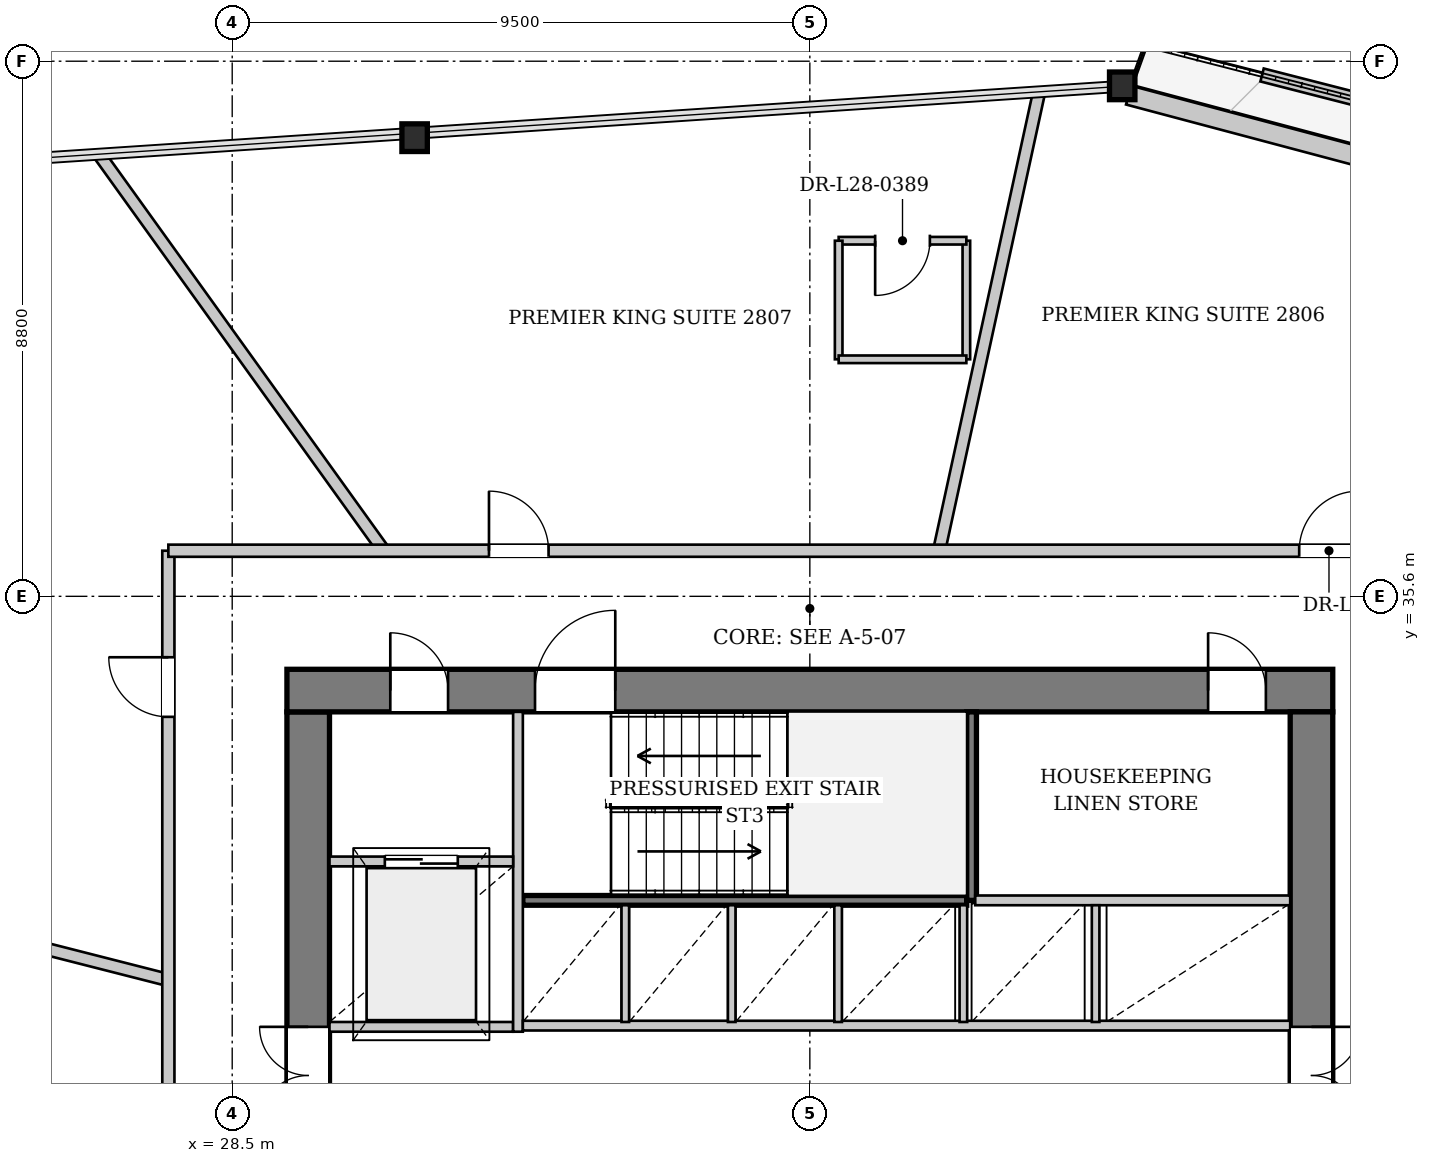
"""IFC4 building model, lengths in metres.
Left out: names, types, materials, properties, quantities, classifications, styles, units other than length and angle.
Written with IfcOpenShell. Run it as: python <this file> out.ifc"""

import sys

from ifc_helpers import new_model, si_unit, direction, frame, frame_2d, origin, origin_2d, place, context, subcontext, project, spatial, rectangle, i_section, extrude, source, transform, mapped, element, fill, save


model = new_model("IFC4")
c1 = context("Model", 3, precision=1e-05, world=origin(), true_north=direction((0.0, 1.0)))
c2 = subcontext(c1, "Body", "Model", "MODEL_VIEW")
j1 = project(units=[si_unit("LENGTHUNIT", "METRE"), si_unit("PLANEANGLEUNIT", "RADIAN")], contexts=[c1])
p1 = place(None, origin())
s1 = spatial("IfcSite", under=j1, at=p1, CompositionType="ELEMENT")
p2 = place(p1, origin())
s2 = spatial("IfcBuilding", under=s1, at=p2, CompositionType="ELEMENT")
p3 = place(p2, frame((0.0, 0.0, 109.25)))
s3 = spatial("IfcBuildingStorey", under=s2, at=p3, CompositionType="ELEMENT", Elevation=109.25)
m1 = source(origin(), c2, "Body", "SweptSolid", [
    extrude(i_section(OverallWidth=0.418, OverallDepth=0.455, WebThickness=0.038, FlangeThickness=0.059, at=origin_2d()), origin(), (0.0, 0.0, 1.0), 3.397),
])
p4 = place(p3, frame((43.282, 43.997, 0.0), z_axis=(-0.085299167136, -0.001221639293, 0.996354635501), x_axis=(0.014320351133, -0.999897458514, 0.0)))
e1 = element("IfcColumn", 1, at=p4, inside=s3, PredefinedType="COLUMN", context=c2, shape_type="MappedRepresentation", body=[
    mapped(m1, transform((0.0, 0.0, 0.0), x_axis=(1.0, 0.0, 0.0), y_axis=(0.0, 1.0, 0.0), z_axis=(0.0, 0.0, 1.0), scale=1.0)),
])
m2 = source(origin(), c2, "Body", "SweptSolid", [
    extrude(i_section(OverallWidth=0.418, OverallDepth=0.455, WebThickness=0.038, FlangeThickness=0.059, at=origin_2d()), origin(), (0.0, 0.0, 1.0), 3.399),
])
p5 = place(p3, frame((31.631, 43.224, 0.0), z_axis=(-0.077283730653, -0.04797911903, 0.995854019982), x_axis=(0.527441478949, -0.849591364295, 0.0)))
e2 = element("IfcColumn", 2, at=p5, inside=s3, PredefinedType="COLUMN", context=c2, shape_type="MappedRepresentation", body=[
    mapped(m2, transform((0.0, 0.0, 0.0), x_axis=(1.0, 0.0, 0.0), y_axis=(0.0, 1.0, 0.0), z_axis=(0.0, 0.0, 1.0), scale=1.0)),
])
p6 = place(p3, frame((43.241, 43.843, 0.0), z_axis=(0.0, 0.0, 1.0), x_axis=(0.966426577456, -0.256942932161, 0.0)))
e3 = element("IfcWall", 3, at=p6, inside=s3, PredefinedType="SOLIDWALL", context=c2, shape_type="SweptSolid", body=[
    extrude(rectangle(XDim=23.353, YDim=0.32, at=frame_2d((11.677, 0.0))), origin(), (0.0, 0.0, 1.0), 2.692),
])
p7 = place(p6, frame((6.923, 0.0, 0.0)))
e4 = element("IfcOpeningElement", 4, at=p7, cuts=e3, PredefinedType="OPENING", context=c2, shape_type="SweptSolid", body=[
    extrude(rectangle(XDim=1.1, YDim=2.3, at=frame_2d((0.55, 1.15))), frame((0.0, 0.17, 0.0), z_axis=(0.0, -1.0, 0.0), x_axis=(1.0, 0.0, 0.0)), (0.0, 0.0, 1.0), 0.34),
])
p8 = place(p6, frame((15.281, 0.0, 0.372)))
e5 = element("IfcOpeningElement", 5, at=p8, cuts=e3, PredefinedType="OPENING", context=c2, shape_type="SweptSolid", body=[
    extrude(rectangle(XDim=1.8, YDim=2.2, at=frame_2d((0.9, 1.1))), frame((0.0, 0.17, 0.0), z_axis=(0.0, -1.0, 0.0), x_axis=(1.0, 0.0, 0.0)), (0.0, 0.0, 1.0), 0.34),
])
p9 = place(p3, frame((65.542, 39.022, 0.0), z_axis=(0.0, 0.0, 1.0), x_axis=(-0.968702389273, 0.248225061217, 0.0)))
e6 = element("IfcWall", 6, at=p9, inside=s3, PredefinedType="PARAPET", context=c2, shape_type="SweptSolid", body=[
    extrude(rectangle(XDim=20.754, YDim=0.22, at=frame_2d((10.377, 0.0))), origin(), (0.0, 0.0, 1.0), 0.3),
])
p10 = place(p3, frame((29.75, 19.5, 0.0), z_axis=(0.0, 0.0, 1.0), x_axis=(0.0, 1.0, 0.0)))
e7 = element("IfcWall", 7, at=p10, inside=s3, PredefinedType="SHEAR", context=c2, shape_type="SweptSolid", body=[
    extrude(rectangle(XDim=14.2, YDim=0.7, at=frame_2d((7.1, 0.0))), origin(), (0.0, 0.0, 1.0), 3.3),
])
p11 = place(p10, frame((7.42, 0.0, 0.0)))
e8 = element("IfcOpeningElement", 8, at=p11, cuts=e7, PredefinedType="OPENING", context=c2, shape_type="SweptSolid", body=[
    extrude(rectangle(XDim=1.6, YDim=2.2, at=frame_2d((0.8, 1.1))), frame((0.0, 0.36, 0.0), z_axis=(0.0, -1.0, 0.0), x_axis=(1.0, 0.0, 0.0)), (0.0, 0.0, 1.0), 0.72),
])
p12 = place(p3, frame((29.4, 34.05, 0.0), z_axis=(0.0, 0.0, 1.0), x_axis=(1.0, 0.0, 0.0)))
e9 = element("IfcWall", 9, at=p12, inside=s3, PredefinedType="SHEAR", context=c2, shape_type="SweptSolid", body=[
    extrude(rectangle(XDim=17.2, YDim=0.7, at=frame_2d((8.6, 0.0))), origin(), (0.0, 0.0, 1.0), 3.3),
])
p13 = place(p12, frame((1.7, 0.0, 0.0)))
e10 = element("IfcOpeningElement", 10, at=p13, cuts=e9, PredefinedType="OPENING", context=c2, shape_type="SweptSolid", body=[
    extrude(rectangle(XDim=0.95, YDim=2.1, at=frame_2d((0.475, 1.05))), frame((0.0, 0.36, 0.0), z_axis=(0.0, -1.0, 0.0), x_axis=(1.0, 0.0, 0.0)), (0.0, 0.0, 1.0), 0.72),
])
p14 = place(p12, frame((4.08, 0.0, 0.0)))
e11 = element("IfcOpeningElement", 11, at=p14, cuts=e9, PredefinedType="OPENING", context=c2, shape_type="SweptSolid", body=[
    extrude(rectangle(XDim=1.32, YDim=2.2, at=frame_2d((0.66, 1.1))), frame((0.0, 0.36, 0.0), z_axis=(0.0, -1.0, 0.0), x_axis=(1.0, 0.0, 0.0)), (0.0, 0.0, 1.0), 0.72),
])
p15 = place(p12, frame((15.15, 0.0, 0.0)))
e12 = element("IfcOpeningElement", 12, at=p15, cuts=e9, PredefinedType="OPENING", context=c2, shape_type="SweptSolid", body=[
    extrude(rectangle(XDim=0.95, YDim=2.1, at=frame_2d((0.475, 1.05))), frame((0.0, 0.36, 0.0), z_axis=(0.0, -1.0, 0.0), x_axis=(1.0, 0.0, 0.0)), (0.0, 0.0, 1.0), 0.72),
])
p16 = place(p3, frame((46.25, 33.7, 0.0), z_axis=(0.0, 0.0, 1.0), x_axis=(0.0, -1.0, 0.0)))
e13 = element("IfcWall", 13, at=p16, inside=s3, PredefinedType="SHEAR", context=c2, shape_type="SweptSolid", body=[
    extrude(rectangle(XDim=14.2, YDim=0.7, at=frame_2d((7.1, 0.0))), origin(), (0.0, 0.0, 1.0), 3.3),
])
p17 = place(p16, frame((5.18, 0.0, 0.0)))
e14 = element("IfcOpeningElement", 14, at=p17, cuts=e13, PredefinedType="OPENING", context=c2, shape_type="SweptSolid", body=[
    extrude(rectangle(XDim=1.6, YDim=2.2, at=frame_2d((0.8, 1.1))), frame((0.0, 0.36, 0.0), z_axis=(0.0, -1.0, 0.0), x_axis=(1.0, 0.0, 0.0)), (0.0, 0.0, 1.0), 0.72),
])
p18 = place(p3, frame((33.28, 30.6, 0.0), z_axis=(0.0, 0.0, 1.0), x_axis=(1.0, 0.0, 0.0)))
e15 = element("IfcWall", 15, at=p18, inside=s3, PredefinedType="PARTITIONING", context=c2, shape_type="SweptSolid", body=[
    extrude(rectangle(XDim=7.3, YDim=0.16, at=frame_2d((3.65, 0.0))), origin(), (0.0, 0.0, 1.0), 3.3),
])
p19 = place(p3, frame((40.66, 30.6, 0.0), z_axis=(0.0, 0.0, 1.0), x_axis=(0.0, 1.0, 0.0)))
e16 = element("IfcWall", 16, at=p19, inside=s3, PredefinedType="PARTITIONING", context=c2, shape_type="SweptSolid", body=[
    extrude(rectangle(XDim=3.1, YDim=0.16, at=frame_2d((1.55, 0.0))), origin(), (0.0, 0.0, 1.0), 3.3),
])
p20 = place(p3, frame((30.1, 28.52, 0.0), z_axis=(0.0, 0.0, 1.0), x_axis=(1.0, 0.0, 0.0)))
e17 = element("IfcWall", 17, at=p20, inside=s3, PredefinedType="PARTITIONING", context=c2, shape_type="SweptSolid", body=[
    extrude(rectangle(XDim=3.02, YDim=0.16, at=frame_2d((1.51, 0.0))), origin(), (0.0, 0.0, 1.0), 3.3),
])
p21 = place(p3, frame((33.2, 28.44, 0.0), z_axis=(0.0, 0.0, 1.0), x_axis=(0.0, 1.0, 0.0)))
e18 = element("IfcWall", 18, at=p21, inside=s3, PredefinedType="PARTITIONING", context=c2, shape_type="SweptSolid", body=[
    extrude(rectangle(XDim=5.26, YDim=0.16, at=frame_2d((2.63, 0.0))), origin(), (0.0, 0.0, 1.0), 3.3),
])
p22 = place(p3, frame((30.1, 31.24, 0.0), z_axis=(0.0, 0.0, 1.0), x_axis=(1.0, 0.0, 0.0)))
e19 = element("IfcWall", 19, at=p22, inside=s3, PredefinedType="PARTITIONING", context=c2, shape_type="SweptSolid", body=[
    extrude(rectangle(XDim=3.02, YDim=0.16, at=frame_2d((1.51, 0.0))), origin(), (0.0, 0.0, 1.0), 3.3),
])
p23 = place(p22, frame((0.91, 0.0, 0.0)))
e20 = element("IfcOpeningElement", 20, at=p23, cuts=e19, PredefinedType="OPENING", context=c2, shape_type="SweptSolid", body=[
    extrude(rectangle(XDim=1.2, YDim=2.2, at=frame_2d((0.6, 1.1))), frame((0.0, 0.09, 0.0), z_axis=(0.0, -1.0, 0.0), x_axis=(1.0, 0.0, 0.0)), (0.0, 0.0, 1.0), 0.18),
])
p24 = place(p3, frame((33.28, 28.54, 0.0), z_axis=(0.0, 0.0, 1.0), x_axis=(1.0, 0.0, 0.0)))
e21 = element("IfcWall", 21, at=p24, inside=s3, PredefinedType="PARTITIONING", context=c2, shape_type="SweptSolid", body=[
    extrude(rectangle(XDim=12.62, YDim=0.16, at=frame_2d((6.31, 0.0))), origin(), (0.0, 0.0, 1.0), 3.3),
])
p25 = place(p3, frame((40.72, 30.6, 0.0), z_axis=(0.0, 0.0, 1.0), x_axis=(1.0, 0.0, 0.0)))
e22 = element("IfcWall", 22, at=p25, inside=s3, PredefinedType="PARTITIONING", context=c2, shape_type="SweptSolid", body=[
    extrude(rectangle(XDim=5.18, YDim=0.16, at=frame_2d((2.59, 0.0))), origin(), (0.0, 0.0, 1.0), 3.3),
])
for number, where, z_axis, x_axis in (
    (23, (34.965, 28.6, 0.0), (0.0, 0.0, 1.0), (0.0, 1.0, 0.0)),
    (24, (36.715, 28.6, 0.0), (0.0, 0.0, 1.0), (0.0, 1.0, 0.0)),
    (25, (38.465, 28.6, 0.0), (0.0, 0.0, 1.0), (0.0, 1.0, 0.0)),
    (26, (40.525, 28.6, 0.0), (0.0, 0.0, 1.0), (0.0, 1.0, 0.0)),
    (27, (42.7, 28.6, 0.0), (0.0, 0.0, 1.0), (0.0, 1.0, 0.0)),
):
    element("IfcWall", number, at=place(p3, frame(where, z_axis=z_axis, x_axis=x_axis)), inside=s3, PredefinedType="PARTITIONING", context=c2, shape_type="SweptSolid", body=[
        extrude(rectangle(XDim=1.92, YDim=0.125, at=frame_2d((0.96, 0.0))), origin(), (0.0, 0.0, 1.0), 3.3),
    ])
p26 = place(p3, frame((40.126, 36.35, 0.0), z_axis=(0.0, 0.0, 1.0), x_axis=(0.213047548257, 0.97704183236, 0.0)))
e28 = element("IfcWall", 28, at=p26, inside=s3, PredefinedType="PARTITIONING", context=c2, shape_type="SweptSolid", body=[
    extrude(rectangle(XDim=7.693, YDim=0.2, at=frame_2d((3.846, 0.0))), origin(), (0.0, 0.0, 1.0), 3.3),
])
p27 = place(p3, frame((30.994, 36.35, 0.0), z_axis=(0.0, 0.0, 1.0), x_axis=(-0.583535361987, 0.812087730058, 0.0)))
e29 = element("IfcWall", 29, at=p27, inside=s3, PredefinedType="PARTITIONING", context=c2, shape_type="SweptSolid", body=[
    extrude(rectangle(XDim=7.994, YDim=0.2, at=frame_2d((3.997, 0.0))), origin(), (0.0, 0.0, 1.0), 3.3),
])
p28 = place(p3, frame((27.45, 29.289, 0.0), z_axis=(0.0, 0.0, 1.0), x_axis=(-0.96902028645, 0.246981141887, 0.0)))
e30 = element("IfcWall", 30, at=p28, inside=s3, PredefinedType="PARTITIONING", context=c2, shape_type="SweptSolid", body=[
    extrude(rectangle(XDim=10.758, YDim=0.2, at=frame_2d((5.379, 0.0))), origin(), (0.0, 0.0, 1.0), 3.3),
])
p29 = place(p3, frame((40.574, 39.498, 0.0), z_axis=(0.0, 0.0, 1.0), x_axis=(0.0, 1.0, 0.0)))
e31 = element("IfcWall", 31, at=p29, inside=s3, PredefinedType="PARTITIONING", context=c2, shape_type="SweptSolid", body=[
    extrude(rectangle(XDim=1.95, YDim=0.125, at=frame_2d((0.975, 0.0))), origin(), (0.0, 0.0, 1.0), 3.3),
])
p30 = place(p3, frame((40.574, 41.448, 0.0), z_axis=(0.0, 0.0, 1.0), x_axis=(-1.0, 0.0, 0.0)))
e32 = element("IfcWall", 32, at=p30, inside=s3, PredefinedType="PARTITIONING", context=c2, shape_type="SweptSolid", body=[
    extrude(rectangle(XDim=2.1, YDim=0.125, at=frame_2d((1.05, 0.0))), origin(), (0.0, 0.0, 1.0), 3.3),
])
p31 = place(p30, frame((0.6, 0.0, 0.0)))
e33 = element("IfcOpeningElement", 33, at=p31, cuts=e32, PredefinedType="OPENING", context=c2, shape_type="SweptSolid", body=[
    extrude(rectangle(XDim=0.9, YDim=2.1, at=frame_2d((0.45, 1.05))), frame((0.0, 0.073, 0.0), z_axis=(0.0, -1.0, 0.0), x_axis=(1.0, 0.0, 0.0)), (0.0, 0.0, 1.0), 0.145),
])
p32 = place(p3, frame((38.474, 41.448, 0.0), z_axis=(0.0, 0.0, 1.0), x_axis=(0.0, -1.0, 0.0)))
e34 = element("IfcWall", 34, at=p32, inside=s3, PredefinedType="PARTITIONING", context=c2, shape_type="SweptSolid", body=[
    extrude(rectangle(XDim=1.95, YDim=0.125, at=frame_2d((0.975, 0.0))), origin(), (0.0, 0.0, 1.0), 3.3),
])
p33 = place(p3, frame((38.474, 39.498, 0.0), z_axis=(0.0, 0.0, 1.0), x_axis=(1.0, 0.0, 0.0)))
e35 = element("IfcWall", 35, at=p33, inside=s3, PredefinedType="PARTITIONING", context=c2, shape_type="SweptSolid", body=[
    extrude(rectangle(XDim=2.1, YDim=0.125, at=frame_2d((1.05, 0.0))), origin(), (0.0, 0.0, 1.0), 3.3),
])
p34 = place(p3, frame((27.45, 16.85, 0.0), z_axis=(0.0, 0.0, 1.0), x_axis=(0.0, 1.0, 0.0)))
e36 = element("IfcWall", 36, at=p34, inside=s3, PredefinedType="PARTITIONING", context=c2, shape_type="SweptSolid", body=[
    extrude(rectangle(XDim=19.5, YDim=0.2, at=frame_2d((9.75, 0.0))), origin(), (0.0, 0.0, 1.0), 3.3),
])
p35 = place(p34, frame((0.3, 0.0, 0.0)))
e37 = element("IfcOpeningElement", 37, at=p35, cuts=e36, PredefinedType="OPENING", context=c2, shape_type="SweptSolid", body=[
    extrude(rectangle(XDim=0.98, YDim=2.15, at=frame_2d((0.49, 1.075))), frame((0.0, 0.11, 0.0), z_axis=(0.0, -1.0, 0.0), x_axis=(1.0, 0.0, 0.0)), (0.0, 0.0, 1.0), 0.22),
])
p36 = place(p34, frame((16.768, 0.0, 0.0)))
e38 = element("IfcOpeningElement", 38, at=p36, cuts=e36, PredefinedType="OPENING", context=c2, shape_type="SweptSolid", body=[
    extrude(rectangle(XDim=0.98, YDim=2.15, at=frame_2d((0.49, 1.075))), frame((0.0, 0.11, 0.0), z_axis=(0.0, -1.0, 0.0), x_axis=(1.0, 0.0, 0.0)), (0.0, 0.0, 1.0), 0.22),
])
p37 = place(p34, frame((9.362, 0.0, 0.0)))
e39 = element("IfcOpeningElement", 39, at=p37, cuts=e36, PredefinedType="OPENING", context=c2, shape_type="SweptSolid", body=[
    extrude(rectangle(XDim=0.98, YDim=2.15, at=frame_2d((0.49, 1.075))), frame((0.0, 0.11, 0.0), z_axis=(0.0, -1.0, 0.0), x_axis=(1.0, 0.0, 0.0)), (0.0, 0.0, 1.0), 0.22),
])
p38 = place(p3, frame((27.45, 36.35, 0.0), z_axis=(0.0, 0.0, 1.0), x_axis=(1.0, 0.0, 0.0)))
e40 = element("IfcWall", 40, at=p38, inside=s3, PredefinedType="PARTITIONING", context=c2, shape_type="SweptSolid", body=[
    extrude(rectangle(XDim=21.1, YDim=0.2, at=frame_2d((10.55, 0.0))), origin(), (0.0, 0.0, 1.0), 3.3),
])
p39 = place(p38, frame((18.598, 0.0, 0.0)))
e41 = element("IfcOpeningElement", 41, at=p39, cuts=e40, PredefinedType="OPENING", context=c2, shape_type="SweptSolid", body=[
    extrude(rectangle(XDim=0.98, YDim=2.15, at=frame_2d((0.49, 1.075))), frame((0.0, 0.11, 0.0), z_axis=(0.0, -1.0, 0.0), x_axis=(1.0, 0.0, 0.0)), (0.0, 0.0, 1.0), 0.22),
])
p40 = place(p38, frame((5.273, 0.0, 0.0)))
e42 = element("IfcOpeningElement", 42, at=p40, cuts=e40, PredefinedType="OPENING", context=c2, shape_type="SweptSolid", body=[
    extrude(rectangle(XDim=0.98, YDim=2.15, at=frame_2d((0.49, 1.075))), frame((0.0, 0.11, 0.0), z_axis=(0.0, -1.0, 0.0), x_axis=(1.0, 0.0, 0.0)), (0.0, 0.0, 1.0), 0.22),
])
m3 = source(origin(), c2, "Body", "SweptSolid", [
    extrude(rectangle(XDim=1.6, YDim=2.2, at=frame_2d((0.8, 1.1))), frame((0.0, 0.025, 0.0), z_axis=(0.0, -1.0, 0.0), x_axis=(1.0, 0.0, 0.0)), (0.0, 0.0, 1.0), 0.05),
])
p41 = place(p11, origin())
e43 = element("IfcDoor", 43, at=p41, inside=s3, OperationType="DOUBLE_DOOR_SINGLE_SWING", PredefinedType="DOOR", context=c2, shape_type="MappedRepresentation", body=[
    mapped(m3, transform((0.0, 0.0, 0.0), x_axis=(1.0, 0.0, 0.0), y_axis=(0.0, 1.0, 0.0), z_axis=(0.0, 0.0, 1.0), scale=1.0)),
])
fill(e8, e43)
m4 = source(origin(), c2, "Body", "SweptSolid", [
    extrude(rectangle(XDim=0.95, YDim=2.1, at=frame_2d((0.475, 1.05))), frame((0.0, 0.025, 0.0), z_axis=(0.0, -1.0, 0.0), x_axis=(1.0, 0.0, 0.0)), (0.0, 0.0, 1.0), 0.05),
])
p42 = place(p13, origin())
e44 = element("IfcDoor", 44, at=p42, inside=s3, OperationType="SINGLE_SWING_LEFT", PredefinedType="DOOR", context=c2, shape_type="MappedRepresentation", body=[
    mapped(m4, transform((0.0, 0.0, 0.0), x_axis=(1.0, 0.0, 0.0), y_axis=(0.0, 1.0, 0.0), z_axis=(0.0, 0.0, 1.0), scale=1.0)),
])
fill(e10, e44)
m5 = source(origin(), c2, "Body", "SweptSolid", [
    extrude(rectangle(XDim=1.32, YDim=2.2, at=frame_2d((0.66, 1.1))), frame((0.0, 0.025, 0.0), z_axis=(0.0, -1.0, 0.0), x_axis=(1.0, 0.0, 0.0)), (0.0, 0.0, 1.0), 0.05),
])
p43 = place(p14, origin())
e45 = element("IfcDoor", 45, at=p43, inside=s3, OperationType="SINGLE_SWING_RIGHT", PredefinedType="DOOR", context=c2, shape_type="MappedRepresentation", body=[
    mapped(m5, transform((0.0, 0.0, 0.0), x_axis=(1.0, 0.0, 0.0), y_axis=(0.0, 1.0, 0.0), z_axis=(0.0, 0.0, 1.0), scale=1.0)),
])
fill(e11, e45)
p44 = place(p17, origin())
e46 = element("IfcDoor", 46, at=p44, inside=s3, OperationType="DOUBLE_DOOR_SINGLE_SWING", PredefinedType="DOOR", context=c2, shape_type="MappedRepresentation", body=[
    mapped(m3, transform((0.0, 0.0, 0.0), x_axis=(1.0, 0.0, 0.0), y_axis=(0.0, 1.0, 0.0), z_axis=(0.0, 0.0, 1.0), scale=1.0)),
])
fill(e14, e46)
m6 = source(origin(), c2, "Body", "SweptSolid", [
    extrude(rectangle(XDim=1.2, YDim=2.2, at=frame_2d((0.6, 1.1))), frame((0.0, 0.025, 0.0), z_axis=(0.0, -1.0, 0.0), x_axis=(1.0, 0.0, 0.0)), (0.0, 0.0, 1.0), 0.05),
])
p45 = place(p23, origin())
e47 = element("IfcDoor", 47, at=p45, inside=s3, OperationType="DOUBLE_DOOR_SLIDING", PredefinedType="DOOR", context=c2, shape_type="MappedRepresentation", body=[
    mapped(m6, transform((0.0, 0.0, 0.0), x_axis=(1.0, 0.0, 0.0), y_axis=(0.0, 1.0, 0.0), z_axis=(0.0, 0.0, 1.0), scale=1.0)),
])
fill(e20, e47)
p46 = place(p15, origin())
e48 = element("IfcDoor", 48, at=p46, inside=s3, OperationType="SINGLE_SWING_LEFT", PredefinedType="DOOR", context=c2, shape_type="MappedRepresentation", body=[
    mapped(m4, transform((0.0, 0.0, 0.0), x_axis=(1.0, 0.0, 0.0), y_axis=(0.0, 1.0, 0.0), z_axis=(0.0, 0.0, 1.0), scale=1.0)),
])
fill(e12, e48)
m7 = source(origin(), c2, "Body", "SweptSolid", [
    extrude(rectangle(XDim=0.9, YDim=2.1, at=frame_2d((0.45, 1.05))), frame((0.0, 0.025, 0.0), z_axis=(0.0, -1.0, 0.0), x_axis=(1.0, 0.0, 0.0)), (0.0, 0.0, 1.0), 0.05),
])
p47 = place(p31, origin())
e49 = element("IfcDoor", 49, at=p47, inside=s3, OperationType="SINGLE_SWING_RIGHT", PredefinedType="DOOR", context=c2, shape_type="MappedRepresentation", body=[
    mapped(m7, transform((0.0, 0.0, 0.0), x_axis=(1.0, 0.0, 0.0), y_axis=(0.0, 1.0, 0.0), z_axis=(0.0, 0.0, 1.0), scale=1.0)),
])
fill(e33, e49)
m8 = source(origin(), c2, "Body", "SweptSolid", [
    extrude(rectangle(XDim=0.98, YDim=2.15, at=frame_2d((0.49, 1.075))), frame((0.0, 0.025, 0.0), z_axis=(0.0, -1.0, 0.0), x_axis=(1.0, 0.0, 0.0)), (0.0, 0.0, 1.0), 0.05),
])
p48 = place(p36, origin())
e50 = element("IfcDoor", 50, at=p48, inside=s3, OperationType="SINGLE_SWING_RIGHT", PredefinedType="DOOR", context=c2, shape_type="MappedRepresentation", body=[
    mapped(m8, transform((0.0, 0.0, 0.0), x_axis=(1.0, 0.0, 0.0), y_axis=(0.0, 1.0, 0.0), z_axis=(0.0, 0.0, 1.0), scale=1.0)),
])
fill(e38, e50)
p49 = place(p39, origin())
e51 = element("IfcDoor", 51, at=p49, inside=s3, OperationType="SINGLE_SWING_RIGHT", PredefinedType="DOOR", context=c2, shape_type="MappedRepresentation", body=[
    mapped(m8, transform((0.0, 0.0, 0.0), x_axis=(1.0, 0.0, 0.0), y_axis=(0.0, 1.0, 0.0), z_axis=(0.0, 0.0, 1.0), scale=1.0)),
])
fill(e41, e51)
p50 = place(p40, origin())
e52 = element("IfcDoor", 52, at=p50, inside=s3, OperationType="SINGLE_SWING_LEFT", PredefinedType="DOOR", context=c2, shape_type="MappedRepresentation", body=[
    mapped(m8, transform((0.0, 0.0, 0.0), x_axis=(1.0, 0.0, 0.0), y_axis=(0.0, 1.0, 0.0), z_axis=(0.0, 0.0, 1.0), scale=1.0)),
])
fill(e42, e52)
save(model, sys.argv[1])
